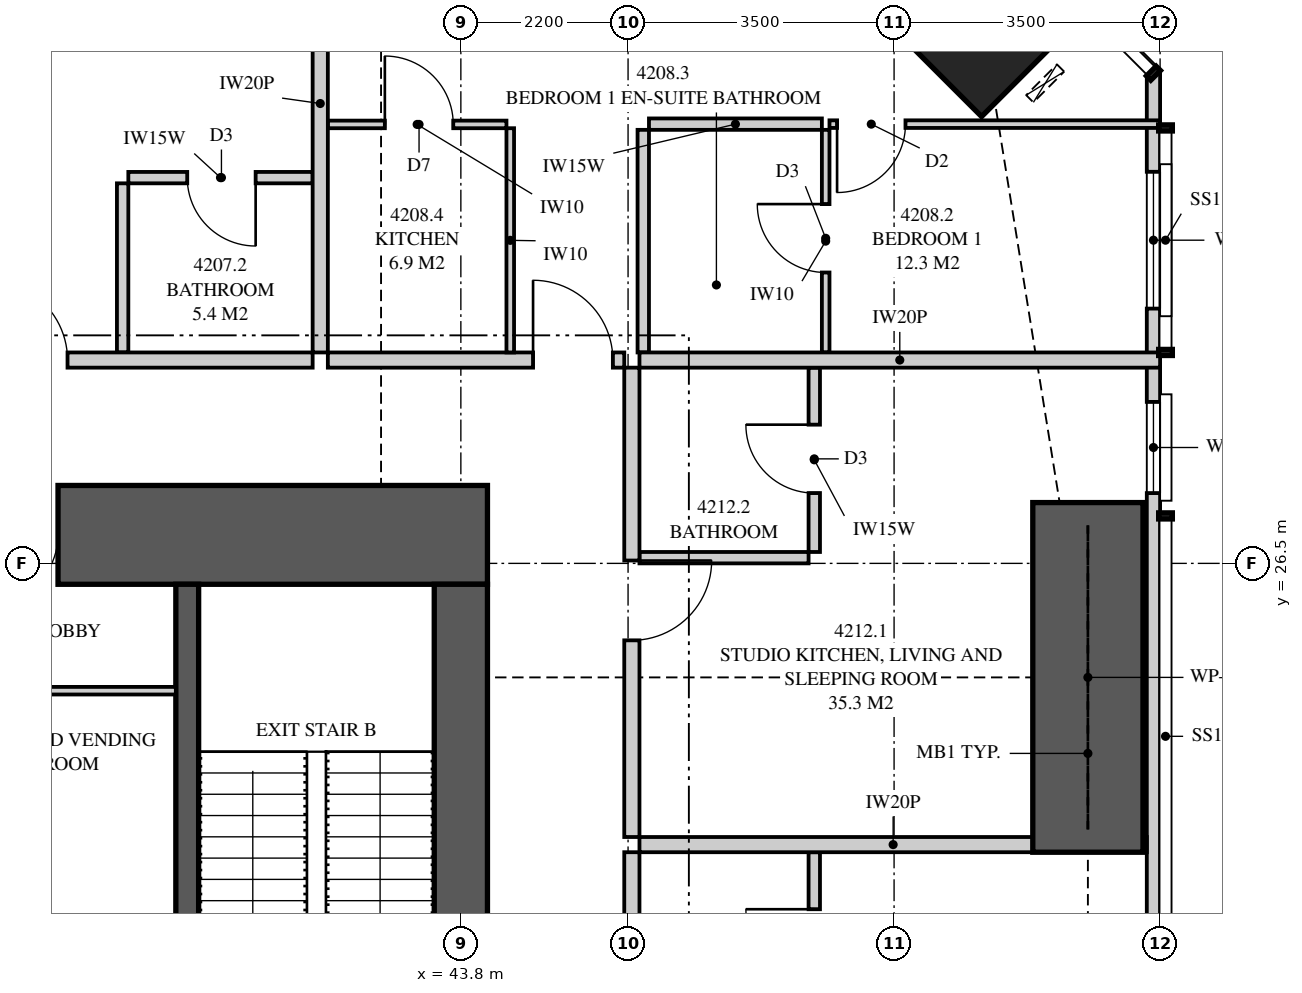
"""IFC4 building model, lengths in metres.
Left out: names, types, materials, properties, quantities, classifications, styles, units other than length and angle.
Written with IfcOpenShell. Run it as: python <this file> out.ifc"""

import sys

from ifc_helpers import new_model, si_unit, direction, frame, frame_2d, origin, origin_2d, place, context, subcontext, project, spatial, polyline, rectangle, hollow_rectangle, outline, extrude, element, fill, save


model = new_model("IFC4")
c1 = context("Model", 3, precision=1e-05, world=origin(), true_north=direction((0.0, 1.0)))
c2 = subcontext(c1, "Body", "Model", "MODEL_VIEW")
j1 = project(units=[si_unit("LENGTHUNIT", "METRE"), si_unit("PLANEANGLEUNIT", "RADIAN")], contexts=[c1])
p1 = place(None, origin())
s1 = spatial("IfcSite", under=j1, at=p1, CompositionType="ELEMENT")
p2 = place(p1, origin())
s2 = spatial("IfcBuilding", under=s1, at=p2, CompositionType="ELEMENT")
p3 = place(p2, frame((0.0, 0.0, 157.7)))
s3 = spatial("IfcBuildingStorey", under=s2, at=p3, CompositionType="ELEMENT", Elevation=157.7)
p4 = place(p3, frame((50.652, 33.652, 0.0), z_axis=(0.0, 0.0, 1.0), x_axis=(-0.707106781187, -0.707106781187, 0.0)))
e1 = element("IfcColumn", 1, at=p4, inside=s3, PredefinedType="COLUMN", context=c2, shape_type="SweptSolid", body=[
    extrude(hollow_rectangle(XDim=1.8, YDim=1.8, WallThickness=0.125, at=origin_2d()), origin(), (0.0, 0.0, 1.0), 3.35),
])
p5 = place(p3, frame((44.15, 26.875, 0.0), z_axis=(0.0, 0.0, 1.0), x_axis=(-1.0, 0.0, 0.0)))
e2 = element("IfcWall", 2, at=p5, inside=s3, PredefinedType="SHEAR", context=c2, shape_type="SweptSolid", body=[
    extrude(rectangle(XDim=8.25, YDim=1.3, at=frame_2d((4.125, 0.0))), origin(), (0.0, 0.0, 1.0), 3.35),
])
p6 = place(p5, frame((5.65, 0.0, 0.0)))
e3 = element("IfcOpeningElement", 3, at=p6, cuts=e2, PredefinedType="OPENING", context=c2, shape_type="SweptSolid", body=[
    extrude(rectangle(XDim=0.9, YDim=2.1, at=frame_2d((0.45, 1.05))), frame((0.0, 0.66, 0.0), z_axis=(0.0, -1.0, 0.0), x_axis=(1.0, 0.0, 0.0)), (0.0, 0.0, 1.0), 1.32),
])
p7 = place(p3, frame((43.8, 19.3, 0.0), z_axis=(0.0, 0.0, 1.0), x_axis=(0.0, 1.0, 0.0)))
e4 = element("IfcWall", 4, at=p7, inside=s3, PredefinedType="SHEAR", context=c2, shape_type="SweptSolid", body=[
    extrude(rectangle(XDim=6.925, YDim=0.7, at=frame_2d((3.462, 0.0))), origin(), (0.0, 0.0, 1.0), 3.35),
])
p8 = place(p3, frame((40.2, 18.5, 0.0), z_axis=(0.0, 0.0, 1.0), x_axis=(0.0, 1.0, 0.0)))
e5 = element("IfcWall", 5, at=p8, inside=s3, PredefinedType="SHEAR", context=c2, shape_type="SweptSolid", body=[
    extrude(rectangle(XDim=7.725, YDim=0.3, at=frame_2d((3.863, 0.0))), origin(), (0.0, 0.0, 1.0), 3.35),
])
p9 = place(p3, frame((52.913, 3.051, 0.0), z_axis=(0.0, 0.0, 1.0), x_axis=(0.0, 1.0, 0.0)))
e6 = element("IfcWall", 6, at=p9, inside=s3, PredefinedType="SOLIDWALL", context=c2, shape_type="SweptSolid", body=[
    extrude(outline(polyline([(0.0, 0.0), (29.897, 0.0), (29.897, 3.11), (22.167, 3.11), (22.167, 2.15), (22.074, 2.15), (22.074, 3.11), (21.949, 3.11), (21.949, 2.15), (9.949, 2.15), (9.949, 3.11), (9.847, 3.11), (9.847, 2.15), (9.706, 2.15), (9.706, 3.11), (0.0, 3.11), (0.0, 0.0)])), frame((0.0, 0.087, 0.0), z_axis=(0.0, -1.0, 0.0), x_axis=(1.0, 0.0, 0.0)), (0.0, 0.0, 1.0), 0.175),
])
p10 = place(p9, frame((1.797, 0.0, 0.4)))
e7 = element("IfcOpeningElement", 7, at=p10, cuts=e6, PredefinedType="OPENING", context=c2, shape_type="SweptSolid", body=[
    extrude(rectangle(XDim=1.8, YDim=1.7, at=frame_2d((0.9, 0.85))), frame((0.0, 0.097, 0.0), z_axis=(0.0, -1.0, 0.0), x_axis=(1.0, 0.0, 0.0)), (0.0, 0.0, 1.0), 0.195),
])
p11 = place(p9, frame((5.149, 0.0, 0.4)))
e8 = element("IfcOpeningElement", 8, at=p11, cuts=e6, PredefinedType="OPENING", context=c2, shape_type="SweptSolid", body=[
    extrude(rectangle(XDim=2.4, YDim=1.7, at=frame_2d((1.2, 0.85))), frame((0.0, 0.097, 0.0), z_axis=(0.0, -1.0, 0.0), x_axis=(1.0, 0.0, 0.0)), (0.0, 0.0, 1.0), 0.195),
])
p12 = place(p9, frame((15.274, 0.0, 0.0)))
e9 = element("IfcOpeningElement", 9, at=p12, cuts=e6, PredefinedType="OPENING", context=c2, shape_type="SweptSolid", body=[
    extrude(rectangle(XDim=1.8, YDim=2.1, at=frame_2d((0.9, 1.05))), frame((0.0, 0.097, 0.0), z_axis=(0.0, -1.0, 0.0), x_axis=(1.0, 0.0, 0.0)), (0.0, 0.0, 1.0), 0.195),
])
p13 = place(p9, frame((12.349, 0.0, 0.4)))
e10 = element("IfcOpeningElement", 10, at=p13, cuts=e6, PredefinedType="OPENING", context=c2, shape_type="SweptSolid", body=[
    extrude(rectangle(XDim=2.4, YDim=1.7, at=frame_2d((1.2, 0.85))), frame((0.0, 0.097, 0.0), z_axis=(0.0, -1.0, 0.0), x_axis=(1.0, 0.0, 0.0)), (0.0, 0.0, 1.0), 0.195),
])
p14 = place(p9, frame((24.373, 0.0, 0.4)))
e11 = element("IfcOpeningElement", 11, at=p14, cuts=e6, PredefinedType="OPENING", context=c2, shape_type="SweptSolid", body=[
    extrude(rectangle(XDim=1.2, YDim=1.7, at=frame_2d((0.6, 0.85))), frame((0.0, 0.097, 0.0), z_axis=(0.0, -1.0, 0.0), x_axis=(1.0, 0.0, 0.0)), (0.0, 0.0, 1.0), 0.195),
])
p15 = place(p9, frame((26.801, 0.0, 0.4)))
e12 = element("IfcOpeningElement", 12, at=p15, cuts=e6, PredefinedType="OPENING", context=c2, shape_type="SweptSolid", body=[
    extrude(rectangle(XDim=1.8, YDim=1.7, at=frame_2d((0.9, 0.85))), frame((0.0, 0.097, 0.0), z_axis=(0.0, -1.0, 0.0), x_axis=(1.0, 0.0, 0.0)), (0.0, 0.0, 1.0), 0.195),
])
p16 = place(p3, frame((41.95, 35.825, 0.0), z_axis=(0.0, 0.0, 1.0), x_axis=(0.0, -1.0, 0.0)))
e13 = element("IfcWall", 13, at=p16, inside=s3, PredefinedType="PARTITIONING", context=c2, shape_type="SweptSolid", body=[
    extrude(outline(polyline([(0.529, 2.15), (0.0, 2.15), (0.0, 0.0), (0.529, 0.0), (0.529, 0.876), (1.021, 0.876), (1.021, 0.0), (6.55, 0.0), (6.55, 3.11), (1.685, 3.11), (1.685, 2.15), (1.021, 2.15), (1.021, 1.274), (0.529, 1.274), (0.529, 2.15)])), frame((0.0, 0.1, 0.0), z_axis=(0.0, -1.0, 0.0), x_axis=(1.0, 0.0, 0.0)), (0.0, 0.0, 1.0), 0.2),
])
p17 = place(p3, frame((34.3, 29.175, 0.0), z_axis=(0.0, 0.0, 1.0), x_axis=(1.0, 0.0, 0.0)))
e14 = element("IfcWall", 14, at=p17, inside=s3, PredefinedType="PARTITIONING", context=c2, shape_type="SweptSolid", body=[
    extrude(rectangle(XDim=7.55, YDim=0.2, at=frame_2d((3.775, 0.0))), origin(), (0.0, 0.0, 1.0), 3.11),
])
p18 = place(p17, frame((3.275, 0.0, 0.0)))
e15 = element("IfcOpeningElement", 15, at=p18, cuts=e14, PredefinedType="OPENING", context=c2, shape_type="SweptSolid", body=[
    extrude(rectangle(XDim=1.05, YDim=2.2, at=frame_2d((0.525, 1.1))), frame((0.0, 0.11, 0.0), z_axis=(0.0, -1.0, 0.0), x_axis=(1.0, 0.0, 0.0)), (0.0, 0.0, 1.0), 0.22),
])
p19 = place(p3, frame((39.425, 31.575, 0.0), z_axis=(0.0, 0.0, 1.0), x_axis=(1.0, 0.0, 0.0)))
e16 = element("IfcWall", 16, at=p19, inside=s3, PredefinedType="PLUMBINGWALL", context=c2, shape_type="SweptSolid", body=[
    extrude(rectangle(XDim=2.425, YDim=0.15, at=frame_2d((1.212, 0.0))), origin(), (0.0, 0.0, 1.0), 3.11),
])
p20 = place(p19, frame((0.775, 0.0, 0.0)))
e17 = element("IfcOpeningElement", 17, at=p20, cuts=e16, PredefinedType="OPENING", context=c2, shape_type="SweptSolid", body=[
    extrude(rectangle(XDim=0.9, YDim=2.1, at=frame_2d((0.45, 1.05))), frame((0.0, 0.085, 0.0), z_axis=(0.0, -1.0, 0.0), x_axis=(1.0, 0.0, 0.0)), (0.0, 0.0, 1.0), 0.17),
])
p21 = place(p3, frame((39.35, 31.5, 0.0), z_axis=(0.0, 0.0, 1.0), x_axis=(0.0, -1.0, 0.0)))
e18 = element("IfcWall", 18, at=p21, inside=s3, PredefinedType="PLUMBINGWALL", context=c2, shape_type="SweptSolid", body=[
    extrude(rectangle(XDim=2.225, YDim=0.15, at=frame_2d((1.113, 0.0))), origin(), (0.0, 0.0, 1.0), 3.11),
])
p22 = place(p3, frame((42.05, 29.175, 0.0), z_axis=(0.0, 0.0, 1.0), x_axis=(1.0, 0.0, 0.0)))
e19 = element("IfcWall", 19, at=p22, inside=s3, PredefinedType="PARTITIONING", context=c2, shape_type="SweptSolid", body=[
    extrude(outline(polyline([(0.0, 0.0), (3.9, 0.0), (3.9, 3.11), (1.046, 3.11), (1.046, 2.531), (0.354, 2.531), (0.354, 3.11), (0.0, 3.11), (0.0, 0.0)])), frame((0.0, 0.1, 0.0), z_axis=(0.0, -1.0, 0.0), x_axis=(1.0, 0.0, 0.0)), (0.0, 0.0, 1.0), 0.2),
])
p23 = place(p22, frame((2.7, 0.0, 0.0)))
e20 = element("IfcOpeningElement", 20, at=p23, cuts=e19, PredefinedType="OPENING", context=c2, shape_type="SweptSolid", body=[
    extrude(rectangle(XDim=1.05, YDim=2.2, at=frame_2d((0.525, 1.1))), frame((0.0, 0.11, 0.0), z_axis=(0.0, -1.0, 0.0), x_axis=(1.0, 0.0, 0.0)), (0.0, 0.0, 1.0), 0.22),
])
p24 = place(p3, frame((48.6, 32.204, 0.0), z_axis=(0.0, 0.0, 1.0), x_axis=(0.0, -1.0, 0.0)))
e21 = element("IfcWall", 21, at=p24, inside=s3, PredefinedType="PARTITIONING", context=c2, shape_type="SweptSolid", body=[
    extrude(rectangle(XDim=2.929, YDim=0.1, at=frame_2d((1.464, 0.0))), origin(), (0.0, 0.0, 1.0), 3.11),
])
p25 = place(p24, frame((0.977, 0.0, 0.0)))
e22 = element("IfcOpeningElement", 22, at=p25, cuts=e21, PredefinedType="OPENING", context=c2, shape_type="SweptSolid", body=[
    extrude(rectangle(XDim=0.9, YDim=2.1, at=frame_2d((0.45, 1.05))), frame((0.0, 0.06, 0.0), z_axis=(0.0, -1.0, 0.0), x_axis=(1.0, 0.0, 0.0)), (0.0, 0.0, 1.0), 0.12),
])
p26 = place(p3, frame((48.65, 32.279, 0.0), z_axis=(0.0, 0.0, 1.0), x_axis=(1.0, 0.0, 0.0)))
e23 = element("IfcWall", 23, at=p26, inside=s3, PredefinedType="PARTITIONING", context=c2, shape_type="SweptSolid", body=[
    extrude(outline(polyline([(0.0, 0.0), (4.35, 0.0), (4.35, 3.11), (3.094, 3.11), (3.094, 2.15), (1.352, 2.15), (1.352, 3.11), (0.0, 3.11), (0.0, 0.0)])), frame((0.0, 0.05, 0.0), z_axis=(0.0, -1.0, 0.0), x_axis=(1.0, 0.0, 0.0)), (0.0, 0.0, 1.0), 0.1),
])
p27 = place(p26, frame((0.1, 0.0, 0.0)))
e24 = element("IfcOpeningElement", 24, at=p27, cuts=e23, PredefinedType="OPENING", context=c2, shape_type="SweptSolid", body=[
    extrude(rectangle(XDim=0.9, YDim=2.1, at=frame_2d((0.45, 1.05))), frame((0.0, 0.06, 0.0), z_axis=(0.0, -1.0, 0.0), x_axis=(1.0, 0.0, 0.0)), (0.0, 0.0, 1.0), 0.12),
])
p28 = place(p3, frame((46.275, 32.279, 0.0), z_axis=(0.0, 0.0, 1.0), x_axis=(1.0, 0.0, 0.0)))
e25 = element("IfcWall", 25, at=p28, inside=s3, PredefinedType="PLUMBINGWALL", context=c2, shape_type="SweptSolid", body=[
    extrude(rectangle(XDim=2.275, YDim=0.15, at=frame_2d((1.138, 0.0))), origin(), (0.0, 0.0, 1.0), 3.11),
])
p29 = place(p3, frame((46.2, 32.204, 0.0), z_axis=(0.0, 0.0, 1.0), x_axis=(0.0, -1.0, 0.0)))
e26 = element("IfcWall", 26, at=p29, inside=s3, PredefinedType="PLUMBINGWALL", context=c2, shape_type="SweptSolid", body=[
    extrude(rectangle(XDim=2.929, YDim=0.15, at=frame_2d((1.464, 0.0))), origin(), (0.0, 0.0, 1.0), 3.11),
])
p30 = place(p3, frame((42.05, 32.275, 0.0), z_axis=(0.0, 0.0, 1.0), x_axis=(1.0, 0.0, 0.0)))
e27 = element("IfcWall", 27, at=p30, inside=s3, PredefinedType="PARTITIONING", context=c2, shape_type="SweptSolid", body=[
    extrude(outline(polyline([(0.0, 0.0), (2.35, 0.0), (2.35, 3.11), (0.996, 3.11), (0.996, 2.531), (0.404, 2.531), (0.404, 3.11), (0.0, 3.11), (0.0, 0.0)])), frame((0.0, 0.05, 0.0), z_axis=(0.0, -1.0, 0.0), x_axis=(1.0, 0.0, 0.0)), (0.0, 0.0, 1.0), 0.1),
])
p31 = place(p30, frame((0.75, 0.0, 0.0)))
e28 = element("IfcOpeningElement", 28, at=p31, cuts=e27, PredefinedType="OPENING", context=c2, shape_type="SweptSolid", body=[
    extrude(rectangle(XDim=0.9, YDim=2.1, at=frame_2d((0.45, 1.05))), frame((0.0, 0.06, 0.0), z_axis=(0.0, -1.0, 0.0), x_axis=(1.0, 0.0, 0.0)), (0.0, 0.0, 1.0), 0.12),
])
p32 = place(p3, frame((44.45, 32.225, 0.0), z_axis=(0.0, 0.0, 1.0), x_axis=(0.0, -1.0, 0.0)))
e29 = element("IfcWall", 29, at=p32, inside=s3, PredefinedType="PARTITIONING", context=c2, shape_type="SweptSolid", body=[
    extrude(rectangle(XDim=2.95, YDim=0.1, at=frame_2d((1.475, 0.0))), origin(), (0.0, 0.0, 1.0), 3.11),
])
p33 = place(p3, frame((46.15, 29.175, 0.0), z_axis=(0.0, 0.0, 1.0), x_axis=(1.0, 0.0, 0.0)))
e30 = element("IfcWall", 30, at=p33, inside=s3, PredefinedType="PARTITIONING", context=c2, shape_type="SweptSolid", body=[
    extrude(outline(polyline([(0.0, 0.0), (6.85, 0.0), (6.85, 3.11), (6.147, 3.11), (6.147, 2.15), (4.303, 2.15), (4.303, 3.11), (0.0, 3.11), (0.0, 0.0)])), frame((0.0, 0.1, 0.0), z_axis=(0.0, -1.0, 0.0), x_axis=(1.0, 0.0, 0.0)), (0.0, 0.0, 1.0), 0.2),
])
p34 = place(p3, frame((52.825, 22.8, 0.0), z_axis=(0.0, 0.0, 1.0), x_axis=(-1.0, 0.0, 0.0)))
e31 = element("IfcWall", 31, at=p34, inside=s3, PredefinedType="PARTITIONING", context=c2, shape_type="SweptSolid", body=[
    extrude(outline(polyline([(0.0, 0.0), (6.675, 0.0), (6.675, 3.11), (1.685, 3.11), (1.685, 2.15), (0.0, 2.15), (0.0, 3.11), (0.0, 0.0)])), frame((0.0, 0.1, 0.0), z_axis=(0.0, -1.0, 0.0), x_axis=(1.0, 0.0, 0.0)), (0.0, 0.0, 1.0), 0.2),
])
p35 = place(p3, frame((46.05, 14.6, 0.0), z_axis=(0.0, 0.0, 1.0), x_axis=(0.0, 1.0, 0.0)))
e32 = element("IfcWall", 32, at=p35, inside=s3, PredefinedType="PARTITIONING", context=c2, shape_type="SweptSolid", body=[
    extrude(rectangle(XDim=8.1, YDim=0.2, at=frame_2d((4.05, 0.0))), origin(), (0.0, 0.0, 1.0), 3.11),
])
p36 = place(p35, frame((3.55, 0.0, 0.0)))
e33 = element("IfcOpeningElement", 33, at=p36, cuts=e32, PredefinedType="OPENING", context=c2, shape_type="SweptSolid", body=[
    extrude(rectangle(XDim=1.05, YDim=2.2, at=frame_2d((0.525, 1.1))), frame((0.0, 0.11, 0.0), z_axis=(0.0, -1.0, 0.0), x_axis=(1.0, 0.0, 0.0)), (0.0, 0.0, 1.0), 0.22),
])
p37 = place(p3, frame((48.45, 20.275, 0.0), z_axis=(0.0, 0.0, 1.0), x_axis=(0.0, 1.0, 0.0)))
e34 = element("IfcWall", 34, at=p37, inside=s3, PredefinedType="PLUMBINGWALL", context=c2, shape_type="SweptSolid", body=[
    extrude(rectangle(XDim=2.425, YDim=0.15, at=frame_2d((1.212, 0.0))), origin(), (0.0, 0.0, 1.0), 3.11),
])
p38 = place(p37, frame((0.775, 0.0, 0.0)))
e35 = element("IfcOpeningElement", 35, at=p38, cuts=e34, PredefinedType="OPENING", context=c2, shape_type="SweptSolid", body=[
    extrude(rectangle(XDim=0.9, YDim=2.1, at=frame_2d((0.45, 1.05))), frame((0.0, 0.085, 0.0), z_axis=(0.0, -1.0, 0.0), x_axis=(1.0, 0.0, 0.0)), (0.0, 0.0, 1.0), 0.17),
])
p39 = place(p3, frame((46.05, 22.9, 0.0), z_axis=(0.0, 0.0, 1.0), x_axis=(0.0, 1.0, 0.0)))
e36 = element("IfcWall", 36, at=p39, inside=s3, PredefinedType="PARTITIONING", context=c2, shape_type="SweptSolid", body=[
    extrude(outline(polyline([(0.0, 0.0), (6.175, 0.0), (6.175, 3.11), (2.446, 3.11), (2.446, 2.531), (1.754, 2.531), (1.754, 3.11), (0.0, 3.11), (0.0, 0.0)])), frame((0.0, 0.1, 0.0), z_axis=(0.0, -1.0, 0.0), x_axis=(1.0, 0.0, 0.0)), (0.0, 0.0, 1.0), 0.2),
])
p40 = place(p39, frame((2.587, 0.0, 0.0)))
e37 = element("IfcOpeningElement", 37, at=p40, cuts=e36, PredefinedType="OPENING", context=c2, shape_type="SweptSolid", body=[
    extrude(rectangle(XDim=1.05, YDim=2.2, at=frame_2d((0.525, 1.1))), frame((0.0, 0.11, 0.0), z_axis=(0.0, -1.0, 0.0), x_axis=(1.0, 0.0, 0.0)), (0.0, 0.0, 1.0), 0.22),
])
p41 = place(p3, frame((48.45, 26.65, 0.0), z_axis=(0.0, 0.0, 1.0), x_axis=(0.0, 1.0, 0.0)))
e38 = element("IfcWall", 38, at=p41, inside=s3, PredefinedType="PLUMBINGWALL", context=c2, shape_type="SweptSolid", body=[
    extrude(rectangle(XDim=2.425, YDim=0.15, at=frame_2d((1.212, 0.0))), origin(), (0.0, 0.0, 1.0), 3.11),
])
p42 = place(p41, frame((0.775, 0.0, 0.0)))
e39 = element("IfcOpeningElement", 39, at=p42, cuts=e38, PredefinedType="OPENING", context=c2, shape_type="SweptSolid", body=[
    extrude(rectangle(XDim=0.9, YDim=2.1, at=frame_2d((0.45, 1.05))), frame((0.0, 0.085, 0.0), z_axis=(0.0, -1.0, 0.0), x_axis=(1.0, 0.0, 0.0)), (0.0, 0.0, 1.0), 0.17),
])
p43 = place(p3, frame((48.375, 26.575, 0.0), z_axis=(0.0, 0.0, 1.0), x_axis=(-1.0, 0.0, 0.0)))
e40 = element("IfcWall", 40, at=p43, inside=s3, PredefinedType="PLUMBINGWALL", context=c2, shape_type="SweptSolid", body=[
    extrude(rectangle(XDim=2.225, YDim=0.15, at=frame_2d((1.113, 0.0))), origin(), (0.0, 0.0, 1.0), 3.11),
])
p44 = place(p3, frame((37.3, 24.825, 0.0), z_axis=(0.0, 0.0, 1.0), x_axis=(1.0, 0.0, 0.0)))
e41 = element("IfcWall", 41, at=p44, inside=s3, PredefinedType="PARTITIONING", context=c2, shape_type="SweptSolid", body=[
    extrude(rectangle(XDim=2.75, YDim=0.1, at=frame_2d((1.375, 0.0))), origin(), (0.0, 0.0, 1.0), 3.11),
])
p45 = place(p3, frame((52.05, 22.7, 0.0), z_axis=(0.0, 0.0, 1.0), x_axis=(0.0, 1.0, 0.0)))
e42 = element("IfcWall", 42, at=p45, inside=s3, PredefinedType="SHEAR", context=c2, shape_type="SweptSolid", body=[
    extrude(rectangle(XDim=4.6, YDim=1.45, at=frame_2d((2.3, 0.0))), origin(), (0.0, 0.0, 1.0), 3.35),
])
p46 = place(p14, origin())
e43 = element("IfcWindow", 43, at=p46, inside=s3, PartitioningType="SINGLE_PANEL", PredefinedType="WINDOW", context=c2, shape_type="SweptSolid", body=[
    extrude(rectangle(XDim=1.2, YDim=1.7, at=frame_2d((0.6, 0.85))), frame((0.0, 0.03, 0.0), z_axis=(0.0, -1.0, 0.0), x_axis=(1.0, 0.0, 0.0)), (0.0, 0.0, 1.0), 0.06),
])
fill(e11, e43)
p47 = place(p15, origin())
e44 = element("IfcWindow", 44, at=p47, inside=s3, PartitioningType="SINGLE_PANEL", PredefinedType="WINDOW", context=c2, shape_type="SweptSolid", body=[
    extrude(rectangle(XDim=1.8, YDim=1.7, at=frame_2d((0.9, 0.85))), frame((0.0, 0.03, 0.0), z_axis=(0.0, -1.0, 0.0), x_axis=(1.0, 0.0, 0.0)), (0.0, 0.0, 1.0), 0.06),
])
fill(e12, e44)
p48 = place(p18, origin())
e45 = element("IfcDoor", 45, at=p48, inside=s3, OperationType="SINGLE_SWING_LEFT", PredefinedType="DOOR", context=c2, shape_type="SweptSolid", body=[
    extrude(rectangle(XDim=1.05, YDim=2.2, at=frame_2d((0.525, 1.1))), frame((0.0, 0.025, 0.0), z_axis=(0.0, -1.0, 0.0), x_axis=(1.0, 0.0, 0.0)), (0.0, 0.0, 1.0), 0.05),
])
fill(e15, e45)
p49 = place(p20, frame((0.9, 0.0, 0.0), z_axis=(0.0, 0.0, 1.0), x_axis=(-1.0, 0.0, 0.0)))
e46 = element("IfcDoor", 46, at=p49, inside=s3, OperationType="SINGLE_SWING_LEFT", PredefinedType="DOOR", context=c2, shape_type="SweptSolid", body=[
    extrude(rectangle(XDim=0.9, YDim=2.1, at=frame_2d((0.45, 1.05))), frame((0.0, 0.025, 0.0), z_axis=(0.0, -1.0, 0.0), x_axis=(1.0, 0.0, 0.0)), (0.0, 0.0, 1.0), 0.05),
])
fill(e17, e46)
p50 = place(p23, origin())
e47 = element("IfcDoor", 47, at=p50, inside=s3, OperationType="SINGLE_SWING_LEFT", PredefinedType="DOOR", context=c2, shape_type="SweptSolid", body=[
    extrude(rectangle(XDim=1.05, YDim=2.2, at=frame_2d((0.525, 1.1))), frame((0.0, 0.025, 0.0), z_axis=(0.0, -1.0, 0.0), x_axis=(1.0, 0.0, 0.0)), (0.0, 0.0, 1.0), 0.05),
])
fill(e20, e47)
p51 = place(p27, frame((0.9, 0.0, 0.0), z_axis=(0.0, 0.0, 1.0), x_axis=(-1.0, 0.0, 0.0)))
e48 = element("IfcDoor", 48, at=p51, inside=s3, OperationType="SINGLE_SWING_RIGHT", PredefinedType="DOOR", context=c2, shape_type="SweptSolid", body=[
    extrude(rectangle(XDim=0.9, YDim=2.1, at=frame_2d((0.45, 1.05))), frame((0.0, 0.025, 0.0), z_axis=(0.0, -1.0, 0.0), x_axis=(1.0, 0.0, 0.0)), (0.0, 0.0, 1.0), 0.05),
])
fill(e24, e48)
p52 = place(p25, frame((0.9, 0.0, 0.0), z_axis=(0.0, 0.0, 1.0), x_axis=(-1.0, 0.0, 0.0)))
e49 = element("IfcDoor", 49, at=p52, inside=s3, OperationType="SINGLE_SWING_RIGHT", PredefinedType="DOOR", context=c2, shape_type="SweptSolid", body=[
    extrude(rectangle(XDim=0.9, YDim=2.1, at=frame_2d((0.45, 1.05))), frame((0.0, 0.025, 0.0), z_axis=(0.0, -1.0, 0.0), x_axis=(1.0, 0.0, 0.0)), (0.0, 0.0, 1.0), 0.05),
])
fill(e22, e49)
p53 = place(p31, origin())
e50 = element("IfcDoor", 50, at=p53, inside=s3, OperationType="SINGLE_SWING_LEFT", PredefinedType="DOOR", context=c2, shape_type="SweptSolid", body=[
    extrude(rectangle(XDim=0.9, YDim=2.1, at=frame_2d((0.45, 1.05))), frame((0.0, 0.025, 0.0), z_axis=(0.0, -1.0, 0.0), x_axis=(1.0, 0.0, 0.0)), (0.0, 0.0, 1.0), 0.05),
])
fill(e28, e50)
p54 = place(p38, origin())
e51 = element("IfcDoor", 51, at=p54, inside=s3, OperationType="SINGLE_SWING_RIGHT", PredefinedType="DOOR", context=c2, shape_type="SweptSolid", body=[
    extrude(rectangle(XDim=0.9, YDim=2.1, at=frame_2d((0.45, 1.05))), frame((0.0, 0.025, 0.0), z_axis=(0.0, -1.0, 0.0), x_axis=(1.0, 0.0, 0.0)), (0.0, 0.0, 1.0), 0.05),
])
fill(e35, e51)
p55 = place(p40, frame((1.05, 0.0, 0.0), z_axis=(0.0, 0.0, 1.0), x_axis=(-1.0, 0.0, 0.0)))
e52 = element("IfcDoor", 52, at=p55, inside=s3, OperationType="SINGLE_SWING_LEFT", PredefinedType="DOOR", context=c2, shape_type="SweptSolid", body=[
    extrude(rectangle(XDim=1.05, YDim=2.2, at=frame_2d((0.525, 1.1))), frame((0.0, 0.025, 0.0), z_axis=(0.0, -1.0, 0.0), x_axis=(1.0, 0.0, 0.0)), (0.0, 0.0, 1.0), 0.05),
])
fill(e37, e52)
p56 = place(p42, origin())
e53 = element("IfcDoor", 53, at=p56, inside=s3, OperationType="SINGLE_SWING_RIGHT", PredefinedType="DOOR", context=c2, shape_type="SweptSolid", body=[
    extrude(rectangle(XDim=0.9, YDim=2.1, at=frame_2d((0.45, 1.05))), frame((0.0, 0.025, 0.0), z_axis=(0.0, -1.0, 0.0), x_axis=(1.0, 0.0, 0.0)), (0.0, 0.0, 1.0), 0.05),
])
fill(e39, e53)
p57 = place(p6, origin())
e54 = element("IfcDoor", 54, at=p57, inside=s3, OperationType="SINGLE_SWING_RIGHT", PredefinedType="DOOR", context=c2, shape_type="SweptSolid", body=[
    extrude(rectangle(XDim=0.9, YDim=2.1, at=frame_2d((0.45, 1.05))), frame((0.0, 0.47, 0.0), z_axis=(0.0, -1.0, 0.0), x_axis=(1.0, 0.0, 0.0)), (0.0, 0.0, 1.0), 0.8),
])
fill(e3, e54)
save(model, sys.argv[1])
